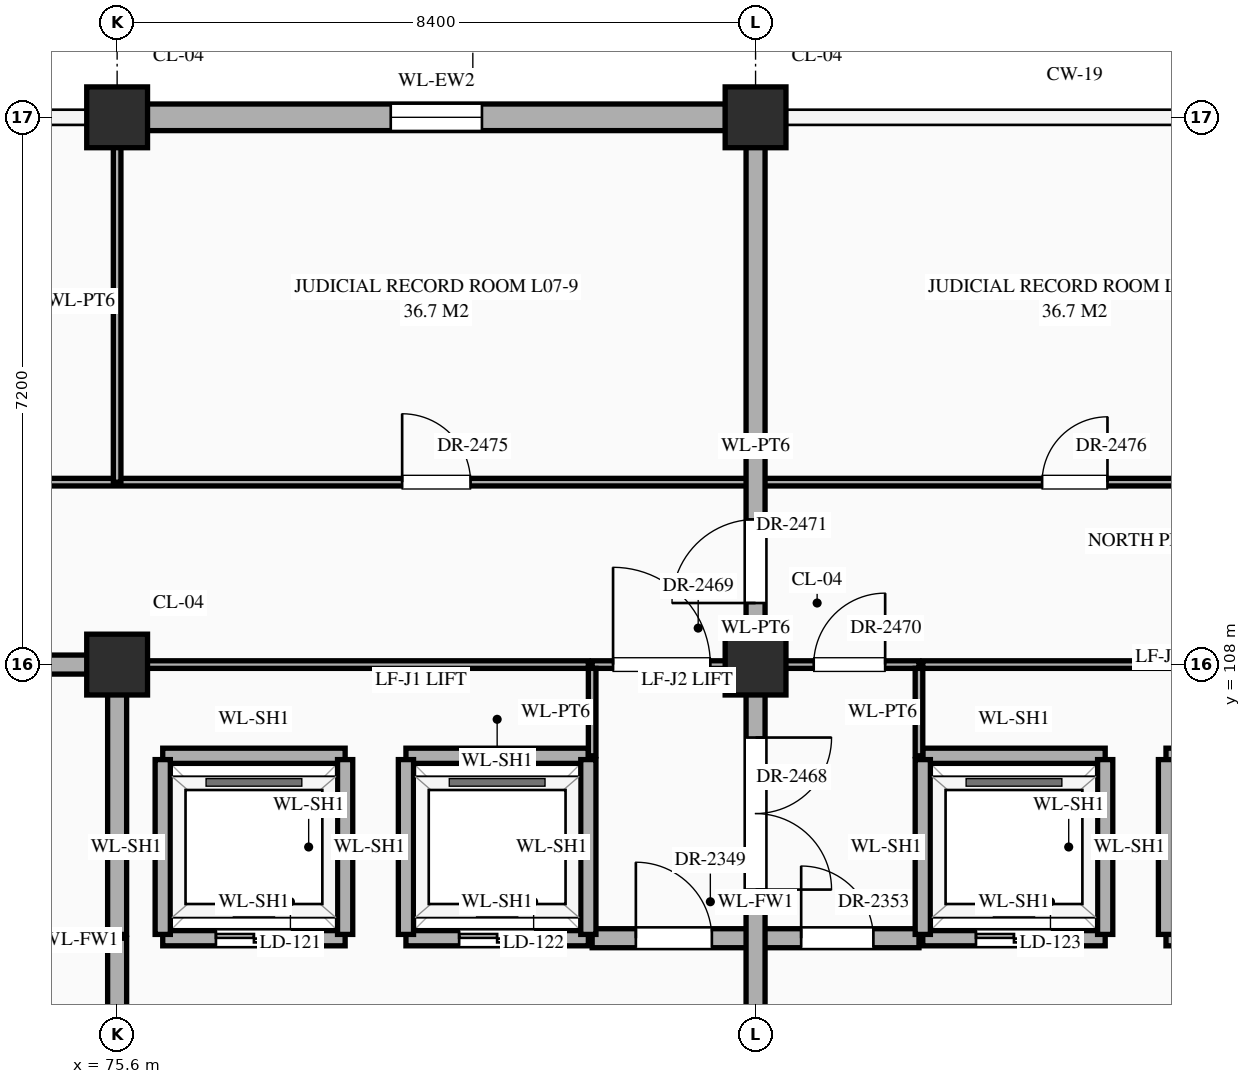
"""IFC4 building model, lengths in metres.
Left out: names, types, materials, properties, quantities, classifications, styles, units other than length and angle.
Written with IfcOpenShell. Run it as: python <this file> out.ifc"""

import sys

from ifc_helpers import new_model, si_unit, direction, frame, frame_2d, origin, origin_2d, place, context, subcontext, project, spatial, rectangle, extrude, element, fill, save


model = new_model("IFC4")
c1 = context("Model", 3, precision=1e-05, world=origin(), true_north=direction((0.0, 1.0)))
c2 = subcontext(c1, "Body", "Model", "MODEL_VIEW")
j1 = project(units=[si_unit("LENGTHUNIT", "METRE"), si_unit("PLANEANGLEUNIT", "RADIAN")], contexts=[c1])
p1 = place(None, origin())
s1 = spatial("IfcSite", under=j1, at=p1, CompositionType="ELEMENT")
p2 = place(p1, origin())
s2 = spatial("IfcBuilding", under=s1, at=p2, CompositionType="ELEMENT")
p3 = place(p2, frame((0.0, 0.0, 30.6)))
s3 = spatial("IfcBuildingStorey", under=s2, at=p3, CompositionType="ELEMENT", Elevation=30.6)
for number, where, z_axis, x_axis in (
    (1, (75.6, 108.0, 0.0), (0.0, 0.0, 1.0), (1.0, 0.0, 0.0)),
    (2, (75.6, 115.2, 0.0), (0.0, 0.0, 1.0), (1.0, 0.0, 0.0)),
    (3, (84.0, 108.0, 0.0), (0.0, 0.0, 1.0), (1.0, 0.0, 0.0)),
    (4, (84.0, 115.2, 0.0), (0.0, 0.0, 1.0), (1.0, 0.0, 0.0)),
):
    element("IfcColumn", number, at=place(p3, frame(where, z_axis=z_axis, x_axis=x_axis)), inside=s3, PredefinedType="COLUMN", context=c2, shape_type="SweptSolid", body=[
        extrude(rectangle(XDim=0.8, YDim=0.8, at=origin_2d()), origin(), (0.0, 0.0, 1.0), 4.5),
    ])
p4 = place(p3, frame((75.995, 115.2, 0.0), z_axis=(0.0, 0.0, 1.0), x_axis=(1.0, 0.0, 0.0)))
e5 = element("IfcWall", 5, at=p4, inside=s3, PredefinedType="STANDARD", context=c2, shape_type="SweptSolid", body=[
    extrude(rectangle(XDim=7.61, YDim=0.35, at=frame_2d((3.805, 0.0))), origin(), (0.0, 0.0, 1.0), 3.59),
])
p5 = place(p4, frame((3.205, 0.0, 0.85)))
e6 = element("IfcOpeningElement", 6, at=p5, cuts=e5, PredefinedType="OPENING", context=c2, shape_type="SweptSolid", body=[
    extrude(rectangle(XDim=1.2, YDim=1.74, at=frame_2d((0.6, 0.87))), frame((0.0, 0.187, 0.0), z_axis=(0.0, -1.0, 0.0), x_axis=(1.0, 0.0, 0.0)), (0.0, 0.0, 1.0), 0.374),
])
p6 = place(p3, frame((76.2, 104.4, 0.0), z_axis=(0.0, 0.0, 1.0), x_axis=(1.0, 0.0, 0.0)))
e7 = element("IfcWall", 7, at=p6, inside=s3, PredefinedType="STANDARD", context=c2, shape_type="SweptSolid", body=[
    extrude(rectangle(XDim=2.4, YDim=0.2, at=frame_2d((1.2, 0.0))), origin(), (0.0, 0.0, 1.0), 4.24),
])
p7 = place(p6, frame((0.7, 0.0, 0.0)))
e8 = element("IfcOpeningElement", 8, at=p7, cuts=e7, PredefinedType="OPENING", context=c2, shape_type="SweptSolid", body=[
    extrude(rectangle(XDim=1.0, YDim=2.15, at=frame_2d((0.5, 1.075))), frame((0.0, 0.112, 0.0), z_axis=(0.0, -1.0, 0.0), x_axis=(1.0, 0.0, 0.0)), (0.0, 0.0, 1.0), 0.224),
])
p8 = place(p3, frame((79.4, 104.4, 0.0), z_axis=(0.0, 0.0, 1.0), x_axis=(1.0, 0.0, 0.0)))
e9 = element("IfcWall", 9, at=p8, inside=s3, PredefinedType="STANDARD", context=c2, shape_type="SweptSolid", body=[
    extrude(rectangle(XDim=2.4, YDim=0.2, at=frame_2d((1.2, 0.0))), origin(), (0.0, 0.0, 1.0), 4.24),
])
p9 = place(p8, frame((0.7, 0.0, 0.0)))
e10 = element("IfcOpeningElement", 10, at=p9, cuts=e9, PredefinedType="OPENING", context=c2, shape_type="SweptSolid", body=[
    extrude(rectangle(XDim=1.0, YDim=2.15, at=frame_2d((0.5, 1.075))), frame((0.0, 0.112, 0.0), z_axis=(0.0, -1.0, 0.0), x_axis=(1.0, 0.0, 0.0)), (0.0, 0.0, 1.0), 0.224),
])
p10 = place(p3, frame((81.85, 104.4, 0.0), z_axis=(0.0, 0.0, 1.0), x_axis=(1.0, 0.0, 0.0)))
e11 = element("IfcWall", 11, at=p10, inside=s3, PredefinedType="STANDARD", context=c2, shape_type="SweptSolid", body=[
    extrude(rectangle(XDim=4.3, YDim=0.25, at=frame_2d((2.15, 0.0))), origin(), (0.0, 0.0, 1.0), 4.24),
])
p11 = place(p10, frame((0.575, 0.0, 0.0)))
e12 = element("IfcOpeningElement", 12, at=p11, cuts=e11, PredefinedType="OPENING", context=c2, shape_type="SweptSolid", body=[
    extrude(rectangle(XDim=1.0, YDim=2.2, at=frame_2d((0.5, 1.1))), frame((0.0, 0.137, 0.0), z_axis=(0.0, -1.0, 0.0), x_axis=(1.0, 0.0, 0.0)), (0.0, 0.0, 1.0), 0.274),
])
p12 = place(p10, frame((2.75, 0.0, 0.0)))
e13 = element("IfcOpeningElement", 13, at=p12, cuts=e11, PredefinedType="OPENING", context=c2, shape_type="SweptSolid", body=[
    extrude(rectangle(XDim=0.95, YDim=2.15, at=frame_2d((0.475, 1.075))), frame((0.0, 0.137, 0.0), z_axis=(0.0, -1.0, 0.0), x_axis=(1.0, 0.0, 0.0)), (0.0, 0.0, 1.0), 0.274),
])
p13 = place(p3, frame((86.2, 104.4, 0.0), z_axis=(0.0, 0.0, 1.0), x_axis=(1.0, 0.0, 0.0)))
e14 = element("IfcWall", 14, at=p13, inside=s3, PredefinedType="STANDARD", context=c2, shape_type="SweptSolid", body=[
    extrude(rectangle(XDim=2.4, YDim=0.2, at=frame_2d((1.2, 0.0))), origin(), (0.0, 0.0, 1.0), 4.24),
])
p14 = place(p13, frame((0.7, 0.0, 0.0)))
e15 = element("IfcOpeningElement", 15, at=p14, cuts=e14, PredefinedType="OPENING", context=c2, shape_type="SweptSolid", body=[
    extrude(rectangle(XDim=1.0, YDim=2.15, at=frame_2d((0.5, 1.075))), frame((0.0, 0.112, 0.0), z_axis=(0.0, -1.0, 0.0), x_axis=(1.0, 0.0, 0.0)), (0.0, 0.0, 1.0), 0.224),
])
p15 = place(p3, frame((89.4, 104.4, 0.0), z_axis=(0.0, 0.0, 1.0), x_axis=(1.0, 0.0, 0.0)))
e16 = element("IfcWall", 16, at=p15, inside=s3, PredefinedType="STANDARD", context=c2, shape_type="SweptSolid", body=[
    extrude(rectangle(XDim=2.4, YDim=0.2, at=frame_2d((1.2, 0.0))), origin(), (0.0, 0.0, 1.0), 4.24),
])
p16 = place(p15, frame((0.7, 0.0, 0.0)))
e17 = element("IfcOpeningElement", 17, at=p16, cuts=e16, PredefinedType="OPENING", context=c2, shape_type="SweptSolid", body=[
    extrude(rectangle(XDim=1.0, YDim=2.15, at=frame_2d((0.5, 1.075))), frame((0.0, 0.112, 0.0), z_axis=(0.0, -1.0, 0.0), x_axis=(1.0, 0.0, 0.0)), (0.0, 0.0, 1.0), 0.224),
])
for number, where, z_axis, x_axis in (
    (18, (76.2, 106.8, 0.0), (0.0, 0.0, 1.0), (1.0, 0.0, 0.0)),
    (19, (79.4, 106.8, 0.0), (0.0, 0.0, 1.0), (1.0, 0.0, 0.0)),
    (20, (86.2, 106.8, 0.0), (0.0, 0.0, 1.0), (1.0, 0.0, 0.0)),
    (21, (89.4, 106.8, 0.0), (0.0, 0.0, 1.0), (1.0, 0.0, 0.0)),
):
    element("IfcWall", number, at=place(p3, frame(where, z_axis=z_axis, x_axis=x_axis)), inside=s3, PredefinedType="STANDARD", context=c2, shape_type="SweptSolid", body=[
        extrude(rectangle(XDim=2.4, YDim=0.2, at=frame_2d((1.2, 0.0))), origin(), (0.0, 0.0, 1.0), 4.24),
    ])
p17 = place(p3, frame((71.4, 108.0, 0.0), z_axis=(0.0, 0.0, 1.0), x_axis=(1.0, 0.0, 0.0)))
e22 = element("IfcWall", 22, at=p17, inside=s3, PredefinedType="STANDARD", context=c2, shape_type="SweptSolid", body=[
    extrude(rectangle(XDim=4.2, YDim=0.25, at=frame_2d((2.1, 0.0))), origin(), (0.0, 0.0, 1.0), 3.39),
])
p18 = place(p17, frame((1.44, 0.0, 0.0)))
e23 = element("IfcOpeningElement", 23, at=p18, cuts=e22, PredefinedType="OPENING", context=c2, shape_type="SweptSolid", body=[
    extrude(rectangle(XDim=1.0, YDim=2.2, at=frame_2d((0.5, 1.1))), frame((0.0, 0.137, 0.0), z_axis=(0.0, -1.0, 0.0), x_axis=(1.0, 0.0, 0.0)), (0.0, 0.0, 1.0), 0.274),
])
p19 = place(p3, frame((75.65, 108.0, 0.0), z_axis=(0.0, 0.0, 1.0), x_axis=(1.0, 0.0, 0.0)))
e24 = element("IfcWall", 24, at=p19, inside=s3, PredefinedType="STANDARD", context=c2, shape_type="SweptSolid", body=[
    extrude(rectangle(XDim=6.15, YDim=0.1, at=frame_2d((3.075, 0.0))), origin(), (0.0, 0.0, 1.0), 3.39),
])
p20 = place(p3, frame((81.85, 108.0, 0.0), z_axis=(0.0, 0.0, 1.0), x_axis=(1.0, 0.0, 0.0)))
e25 = element("IfcWall", 25, at=p20, inside=s3, PredefinedType="STANDARD", context=c2, shape_type="SweptSolid", body=[
    extrude(rectangle(XDim=4.3, YDim=0.1, at=frame_2d((2.15, 0.0))), origin(), (0.0, 0.0, 1.0), 3.39),
])
p21 = place(p20, frame((0.275, 0.0, 0.0)))
e26 = element("IfcOpeningElement", 26, at=p21, cuts=e25, PredefinedType="OPENING", context=c2, shape_type="SweptSolid", body=[
    extrude(rectangle(XDim=1.28, YDim=2.35, at=frame_2d((0.64, 1.175))), frame((0.0, 0.062, 0.0), z_axis=(0.0, -1.0, 0.0), x_axis=(1.0, 0.0, 0.0)), (0.0, 0.0, 1.0), 0.124),
])
p22 = place(p20, frame((2.915, 0.0, 0.0)))
e27 = element("IfcOpeningElement", 27, at=p22, cuts=e25, PredefinedType="OPENING", context=c2, shape_type="SweptSolid", body=[
    extrude(rectangle(XDim=0.94, YDim=2.3, at=frame_2d((0.47, 1.15))), frame((0.0, 0.062, 0.0), z_axis=(0.0, -1.0, 0.0), x_axis=(1.0, 0.0, 0.0)), (0.0, 0.0, 1.0), 0.124),
])
p23 = place(p3, frame((86.2, 108.0, 0.0), z_axis=(0.0, 0.0, 1.0), x_axis=(1.0, 0.0, 0.0)))
e28 = element("IfcWall", 28, at=p23, inside=s3, PredefinedType="STANDARD", context=c2, shape_type="SweptSolid", body=[
    extrude(rectangle(XDim=6.15, YDim=0.1, at=frame_2d((3.075, 0.0))), origin(), (0.0, 0.0, 1.0), 3.39),
])
p24 = place(p3, frame((67.2, 110.4, 0.0), z_axis=(0.0, 0.0, 1.0), x_axis=(1.0, 0.0, 0.0)))
e29 = element("IfcWall", 29, at=p24, inside=s3, PredefinedType="STANDARD", context=c2, shape_type="SweptSolid", body=[
    extrude(rectangle(XDim=33.6, YDim=0.1, at=frame_2d((16.8, 0.0))), origin(), (0.0, 0.0, 1.0), 4.24),
])
p25 = place(p24, frame((3.63, 0.0, 0.0)))
e30 = element("IfcOpeningElement", 30, at=p25, cuts=e29, PredefinedType="OPENING", context=c2, shape_type="SweptSolid", body=[
    extrude(rectangle(XDim=1.14, YDim=2.4, at=frame_2d((0.57, 1.2))), frame((0.0, 0.062, 0.0), z_axis=(0.0, -1.0, 0.0), x_axis=(1.0, 0.0, 0.0)), (0.0, 0.0, 1.0), 0.124),
])
p26 = place(p24, frame((12.15, 0.0, 0.0)))
e31 = element("IfcOpeningElement", 31, at=p26, cuts=e29, PredefinedType="OPENING", context=c2, shape_type="SweptSolid", body=[
    extrude(rectangle(XDim=0.9, YDim=2.15, at=frame_2d((0.45, 1.075))), frame((0.0, 0.062, 0.0), z_axis=(0.0, -1.0, 0.0), x_axis=(1.0, 0.0, 0.0)), (0.0, 0.0, 1.0), 0.124),
])
p27 = place(p24, frame((20.57, 0.0, 0.0)))
e32 = element("IfcOpeningElement", 32, at=p27, cuts=e29, PredefinedType="OPENING", context=c2, shape_type="SweptSolid", body=[
    extrude(rectangle(XDim=0.86, YDim=2.1, at=frame_2d((0.43, 1.05))), frame((0.0, 0.062, 0.0), z_axis=(0.0, -1.0, 0.0), x_axis=(1.0, 0.0, 0.0)), (0.0, 0.0, 1.0), 0.124),
])
p28 = place(p24, frame((28.94, 0.0, 0.0)))
e33 = element("IfcOpeningElement", 33, at=p28, cuts=e29, PredefinedType="OPENING", context=c2, shape_type="SweptSolid", body=[
    extrude(rectangle(XDim=0.92, YDim=2.15, at=frame_2d((0.46, 1.075))), frame((0.0, 0.062, 0.0), z_axis=(0.0, -1.0, 0.0), x_axis=(1.0, 0.0, 0.0)), (0.0, 0.0, 1.0), 0.124),
])
p29 = place(p3, frame((75.6, 100.8, 0.0), z_axis=(0.0, 0.0, 1.0), x_axis=(0.0, 1.0, 0.0)))
e34 = element("IfcWall", 34, at=p29, inside=s3, PredefinedType="STANDARD", context=c2, shape_type="SweptSolid", body=[
    extrude(rectangle(XDim=3.6, YDim=0.25, at=frame_2d((1.8, 0.0))), origin(), (0.0, 0.0, 1.0), 3.49),
])
p30 = place(p29, frame((0.885, 0.0, 0.0)))
e35 = element("IfcOpeningElement", 35, at=p30, cuts=e34, PredefinedType="OPENING", context=c2, shape_type="SweptSolid", body=[
    extrude(rectangle(XDim=0.95, YDim=2.15, at=frame_2d((0.475, 1.075))), frame((0.0, 0.137, 0.0), z_axis=(0.0, -1.0, 0.0), x_axis=(1.0, 0.0, 0.0)), (0.0, 0.0, 1.0), 0.274),
])
p31 = place(p3, frame((75.6, 104.45, 0.0), z_axis=(0.0, 0.0, 1.0), x_axis=(0.0, 1.0, 0.0)))
e36 = element("IfcWall", 36, at=p31, inside=s3, PredefinedType="STANDARD", context=c2, shape_type="SweptSolid", body=[
    extrude(rectangle(XDim=3.5, YDim=0.25, at=frame_2d((1.75, 0.0))), origin(), (0.0, 0.0, 1.0), 3.49),
])
p32 = place(p3, frame((75.6, 110.4, 0.0), z_axis=(0.0, 0.0, 1.0), x_axis=(0.0, 1.0, 0.0)))
e37 = element("IfcWall", 37, at=p32, inside=s3, PredefinedType="STANDARD", context=c2, shape_type="SweptSolid", body=[
    extrude(rectangle(XDim=4.76, YDim=0.1, at=frame_2d((2.38, 0.0))), origin(), (0.0, 0.0, 1.0), 3.49),
])
for number, where, z_axis, x_axis in (
    (38, (76.2, 104.45, 0.0), (0.0, 0.0, 1.0), (0.0, 1.0, 0.0)),
    (39, (78.6, 104.45, 0.0), (0.0, 0.0, 1.0), (0.0, 1.0, 0.0)),
    (40, (79.4, 104.45, 0.0), (0.0, 0.0, 1.0), (0.0, 1.0, 0.0)),
    (41, (81.8, 104.45, 0.0), (0.0, 0.0, 1.0), (0.0, 1.0, 0.0)),
):
    element("IfcWall", number, at=place(p3, frame(where, z_axis=z_axis, x_axis=x_axis)), inside=s3, PredefinedType="STANDARD", context=c2, shape_type="SweptSolid", body=[
        extrude(rectangle(XDim=2.3, YDim=0.2, at=frame_2d((1.15, 0.0))), origin(), (0.0, 0.0, 1.0), 4.24),
    ])
p33 = place(p3, frame((81.85, 106.8, 0.0), z_axis=(0.0, 0.0, 1.0), x_axis=(0.0, 1.0, 0.0)))
e42 = element("IfcWall", 42, at=p33, inside=s3, PredefinedType="STANDARD", context=c2, shape_type="SweptSolid", body=[
    extrude(rectangle(XDim=1.15, YDim=0.1, at=frame_2d((0.575, 0.0))), origin(), (0.0, 0.0, 1.0), 4.24),
])
p34 = place(p3, frame((84.0, 79.24, 0.0), z_axis=(0.0, 0.0, 1.0), x_axis=(0.0, 1.0, 0.0)))
e43 = element("IfcWall", 43, at=p34, inside=s3, PredefinedType="STANDARD", context=c2, shape_type="SweptSolid", body=[
    extrude(rectangle(XDim=35.92, YDim=0.25, at=frame_2d((17.96, 0.0))), origin(), (0.0, 0.0, 1.0), 3.49),
])
p35 = place(p34, frame((22.77, 0.0, 0.0)))
e44 = element("IfcOpeningElement", 44, at=p35, cuts=e43, PredefinedType="OPENING", context=c2, shape_type="SweptSolid", body=[
    extrude(rectangle(XDim=1.5, YDim=2.25, at=frame_2d((0.75, 1.125))), frame((0.0, 0.137, 0.0), z_axis=(0.0, -1.0, 0.0), x_axis=(1.0, 0.0, 0.0)), (0.0, 0.0, 1.0), 0.274),
])
p36 = place(p34, frame((12.525, 0.0, 0.0)))
e45 = element("IfcOpeningElement", 45, at=p36, cuts=e43, PredefinedType="OPENING", context=c2, shape_type="SweptSolid", body=[
    extrude(rectangle(XDim=0.95, YDim=2.15, at=frame_2d((0.475, 1.075))), frame((0.0, 0.137, 0.0), z_axis=(0.0, -1.0, 0.0), x_axis=(1.0, 0.0, 0.0)), (0.0, 0.0, 1.0), 0.274),
])
p37 = place(p34, frame((15.22, 0.0, 0.0)))
e46 = element("IfcOpeningElement", 46, at=p37, cuts=e43, PredefinedType="OPENING", context=c2, shape_type="SweptSolid", body=[
    extrude(rectangle(XDim=1.0, YDim=2.2, at=frame_2d((0.5, 1.1))), frame((0.0, 0.137, 0.0), z_axis=(0.0, -1.0, 0.0), x_axis=(1.0, 0.0, 0.0)), (0.0, 0.0, 1.0), 0.274),
])
p38 = place(p34, frame((25.8, 0.0, 0.0)))
e47 = element("IfcOpeningElement", 47, at=p38, cuts=e43, PredefinedType="OPENING", context=c2, shape_type="SweptSolid", body=[
    extrude(rectangle(XDim=2.0, YDim=2.4, at=frame_2d((1.0, 1.2))), frame((0.0, 0.137, 0.0), z_axis=(0.0, -1.0, 0.0), x_axis=(1.0, 0.0, 0.0)), (0.0, 0.0, 1.0), 0.274),
])
p39 = place(p34, frame((29.57, 0.0, 0.0)))
e48 = element("IfcOpeningElement", 48, at=p39, cuts=e43, PredefinedType="OPENING", context=c2, shape_type="SweptSolid", body=[
    extrude(rectangle(XDim=1.1, YDim=2.2, at=frame_2d((0.55, 1.1))), frame((0.0, 0.137, 0.0), z_axis=(0.0, -1.0, 0.0), x_axis=(1.0, 0.0, 0.0)), (0.0, 0.0, 1.0), 0.274),
])
p40 = place(p34, frame((5.25, 0.0, 0.0)))
e49 = element("IfcOpeningElement", 49, at=p40, cuts=e43, PredefinedType="OPENING", context=c2, shape_type="SweptSolid", body=[
    extrude(rectangle(XDim=1.1, YDim=2.2, at=frame_2d((0.55, 1.1))), frame((0.0, 0.137, 0.0), z_axis=(0.0, -1.0, 0.0), x_axis=(1.0, 0.0, 0.0)), (0.0, 0.0, 1.0), 0.274),
])
p41 = place(p3, frame((86.15, 106.8, 0.0), z_axis=(0.0, 0.0, 1.0), x_axis=(0.0, 1.0, 0.0)))
e50 = element("IfcWall", 50, at=p41, inside=s3, PredefinedType="STANDARD", context=c2, shape_type="SweptSolid", body=[
    extrude(rectangle(XDim=1.15, YDim=0.1, at=frame_2d((0.575, 0.0))), origin(), (0.0, 0.0, 1.0), 4.24),
])
for number, where, z_axis, x_axis in (
    (51, (86.2, 104.45, 0.0), (0.0, 0.0, 1.0), (0.0, 1.0, 0.0)),
    (52, (88.6, 104.45, 0.0), (0.0, 0.0, 1.0), (0.0, 1.0, 0.0)),
    (53, (89.4, 104.45, 0.0), (0.0, 0.0, 1.0), (0.0, 1.0, 0.0)),
):
    element("IfcWall", number, at=place(p3, frame(where, z_axis=z_axis, x_axis=x_axis)), inside=s3, PredefinedType="STANDARD", context=c2, shape_type="SweptSolid", body=[
        extrude(rectangle(XDim=2.3, YDim=0.2, at=frame_2d((1.15, 0.0))), origin(), (0.0, 0.0, 1.0), 4.24),
    ])
p42 = place(p5, origin())
e54 = element("IfcWindow", 54, at=p42, inside=s3, PartitioningType="SINGLE_PANEL", PredefinedType="WINDOW", context=c2, shape_type="SweptSolid", body=[
    extrude(rectangle(XDim=1.2, YDim=1.74, at=frame_2d((0.6, 0.87))), frame((0.0, 0.03, 0.0), z_axis=(0.0, -1.0, 0.0), x_axis=(1.0, 0.0, 0.0)), (0.0, 0.0, 1.0), 0.06),
])
fill(e6, e54)
p43 = place(p7, origin())
e55 = element("IfcDoor", 55, at=p43, inside=s3, OperationType="DOUBLE_DOOR_SLIDING", PredefinedType="DOOR", context=c2, shape_type="SweptSolid", body=[
    extrude(rectangle(XDim=1.0, YDim=2.15, at=frame_2d((0.5, 1.075))), frame((0.0, 0.025, 0.0), z_axis=(0.0, -1.0, 0.0), x_axis=(1.0, 0.0, 0.0)), (0.0, 0.0, 1.0), 0.05),
])
fill(e8, e55)
p44 = place(p9, origin())
e56 = element("IfcDoor", 56, at=p44, inside=s3, OperationType="DOUBLE_DOOR_SLIDING", PredefinedType="DOOR", context=c2, shape_type="SweptSolid", body=[
    extrude(rectangle(XDim=1.0, YDim=2.15, at=frame_2d((0.5, 1.075))), frame((0.0, 0.025, 0.0), z_axis=(0.0, -1.0, 0.0), x_axis=(1.0, 0.0, 0.0)), (0.0, 0.0, 1.0), 0.05),
])
fill(e10, e56)
p45 = place(p14, origin())
e57 = element("IfcDoor", 57, at=p45, inside=s3, OperationType="DOUBLE_DOOR_SLIDING", PredefinedType="DOOR", context=c2, shape_type="SweptSolid", body=[
    extrude(rectangle(XDim=1.0, YDim=2.15, at=frame_2d((0.5, 1.075))), frame((0.0, 0.025, 0.0), z_axis=(0.0, -1.0, 0.0), x_axis=(1.0, 0.0, 0.0)), (0.0, 0.0, 1.0), 0.05),
])
fill(e15, e57)
p46 = place(p11, origin())
e58 = element("IfcDoor", 58, at=p46, inside=s3, OperationType="SINGLE_SWING_LEFT", PredefinedType="DOOR", context=c2, shape_type="SweptSolid", body=[
    extrude(rectangle(XDim=1.0, YDim=2.2, at=frame_2d((0.5, 1.1))), frame((0.0, 0.025, 0.0), z_axis=(0.0, -1.0, 0.0), x_axis=(1.0, 0.0, 0.0)), (0.0, 0.0, 1.0), 0.05),
])
fill(e12, e58)
p47 = place(p12, origin())
e59 = element("IfcDoor", 59, at=p47, inside=s3, OperationType="SINGLE_SWING_LEFT", PredefinedType="DOOR", context=c2, shape_type="SweptSolid", body=[
    extrude(rectangle(XDim=0.95, YDim=2.15, at=frame_2d((0.475, 1.075))), frame((0.0, 0.025, 0.0), z_axis=(0.0, -1.0, 0.0), x_axis=(1.0, 0.0, 0.0)), (0.0, 0.0, 1.0), 0.05),
])
fill(e13, e59)
p48 = place(p38, frame((2.0, 0.0, 0.0), z_axis=(0.0, 0.0, 1.0), x_axis=(-1.0, 0.0, 0.0)))
e60 = element("IfcDoor", 60, at=p48, inside=s3, OperationType="DOUBLE_DOOR_SINGLE_SWING", PredefinedType="DOOR", context=c2, shape_type="SweptSolid", body=[
    extrude(rectangle(XDim=2.0, YDim=2.4, at=frame_2d((1.0, 1.2))), frame((0.0, 0.025, 0.0), z_axis=(0.0, -1.0, 0.0), x_axis=(1.0, 0.0, 0.0)), (0.0, 0.0, 1.0), 0.05),
])
fill(e47, e60)
p49 = place(p21, origin())
e61 = element("IfcDoor", 61, at=p49, inside=s3, OperationType="SINGLE_SWING_LEFT", PredefinedType="DOOR", context=c2, shape_type="SweptSolid", body=[
    extrude(rectangle(XDim=1.28, YDim=2.35, at=frame_2d((0.64, 1.175))), frame((0.0, 0.025, 0.0), z_axis=(0.0, -1.0, 0.0), x_axis=(1.0, 0.0, 0.0)), (0.0, 0.0, 1.0), 0.05),
])
fill(e26, e61)
p50 = place(p22, origin())
e62 = element("IfcDoor", 62, at=p50, inside=s3, OperationType="SINGLE_SWING_RIGHT", PredefinedType="DOOR", context=c2, shape_type="SweptSolid", body=[
    extrude(rectangle(XDim=0.94, YDim=2.3, at=frame_2d((0.47, 1.15))), frame((0.0, 0.025, 0.0), z_axis=(0.0, -1.0, 0.0), x_axis=(1.0, 0.0, 0.0)), (0.0, 0.0, 1.0), 0.05),
])
fill(e27, e62)
p51 = place(p39, origin())
e63 = element("IfcDoor", 63, at=p51, inside=s3, OperationType="SINGLE_SWING_LEFT", PredefinedType="DOOR", context=c2, shape_type="SweptSolid", body=[
    extrude(rectangle(XDim=1.1, YDim=2.2, at=frame_2d((0.55, 1.1))), frame((0.0, 0.025, 0.0), z_axis=(0.0, -1.0, 0.0), x_axis=(1.0, 0.0, 0.0)), (0.0, 0.0, 1.0), 0.05),
])
fill(e48, e63)
p52 = place(p26, origin())
e64 = element("IfcDoor", 64, at=p52, inside=s3, OperationType="SINGLE_SWING_LEFT", PredefinedType="DOOR", context=c2, shape_type="SweptSolid", body=[
    extrude(rectangle(XDim=0.9, YDim=2.15, at=frame_2d((0.45, 1.075))), frame((0.0, 0.025, 0.0), z_axis=(0.0, -1.0, 0.0), x_axis=(1.0, 0.0, 0.0)), (0.0, 0.0, 1.0), 0.05),
])
fill(e31, e64)
p53 = place(p27, origin())
e65 = element("IfcDoor", 65, at=p53, inside=s3, OperationType="SINGLE_SWING_RIGHT", PredefinedType="DOOR", context=c2, shape_type="SweptSolid", body=[
    extrude(rectangle(XDim=0.86, YDim=2.1, at=frame_2d((0.43, 1.05))), frame((0.0, 0.025, 0.0), z_axis=(0.0, -1.0, 0.0), x_axis=(1.0, 0.0, 0.0)), (0.0, 0.0, 1.0), 0.05),
])
fill(e32, e65)
save(model, sys.argv[1])
